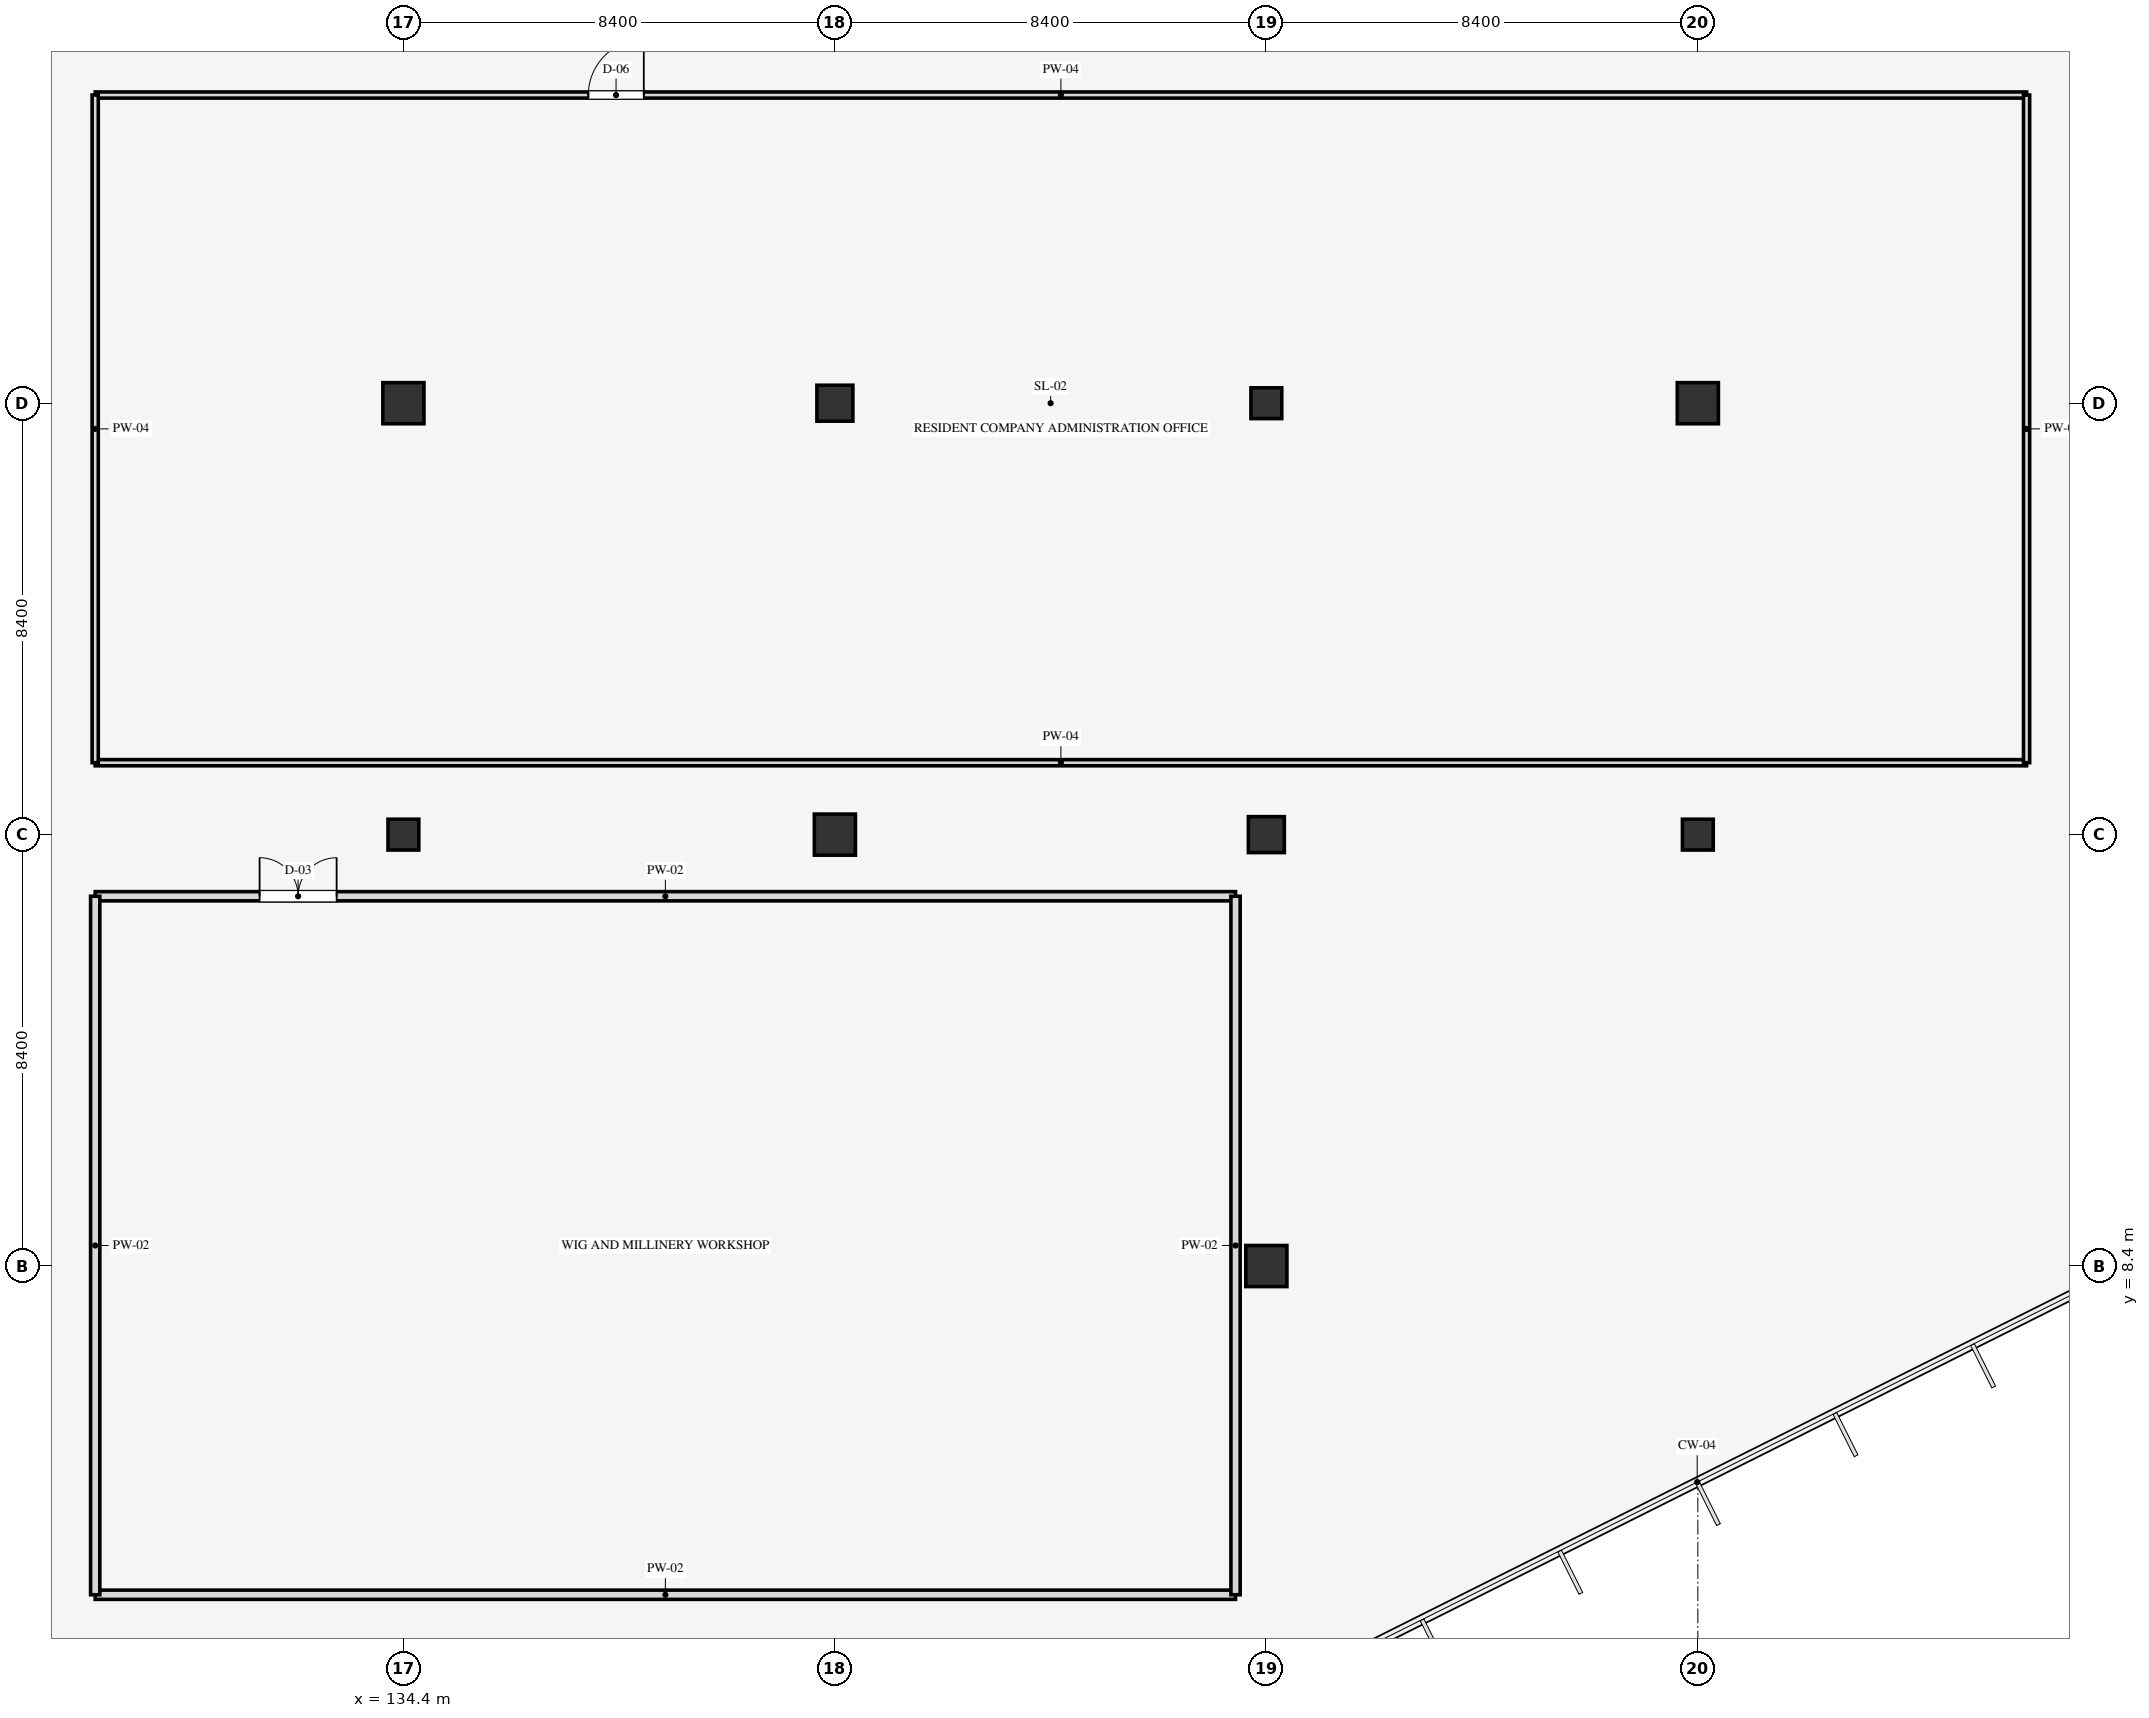
"""IFC4 building model, lengths in metres.
Left out: names, types, materials, properties, quantities, classifications, styles, units other than length and angle.
Written with IfcOpenShell. Run it as: python <this file> out.ifc"""

import sys

from ifc_helpers import new_model, si_unit, direction, frame, frame_2d, origin, origin_2d, place, context, subcontext, project, spatial, rectangle, extrude, element, fill, save


model = new_model("IFC4")
c1 = context("Model", 3, precision=1e-05, world=origin(), true_north=direction((0.0, 1.0)))
c2 = subcontext(c1, "Body", "Model", "MODEL_VIEW")
j1 = project(units=[si_unit("LENGTHUNIT", "METRE"), si_unit("PLANEANGLEUNIT", "RADIAN")], contexts=[c1])
p1 = place(None, origin())
s1 = spatial("IfcSite", under=j1, at=p1, CompositionType="ELEMENT")
p2 = place(p1, origin())
s2 = spatial("IfcBuilding", under=s1, at=p2, CompositionType="ELEMENT")
p3 = place(p2, frame((0.0, 0.0, 5.4)))
s3 = spatial("IfcBuildingStorey", under=s2, at=p3, CompositionType="ELEMENT", Elevation=5.4)
p4 = place(p3, frame((134.4, 16.8, 0.0), z_axis=(0.0, 0.0, 1.0), x_axis=(1.0, 0.0, 0.0)))
e1 = element("IfcColumn", 1, at=p4, inside=s3, PredefinedType="COLUMN", context=c2, shape_type="SweptSolid", body=[
    extrude(rectangle(XDim=0.6, YDim=0.6, at=origin_2d()), origin(), (0.0, 0.0, 1.0), 4.5),
])
for number, where, z_axis, x_axis in (
    (2, (134.4, 25.2, 0.0), (0.0, 0.0, 1.0), (1.0, 0.0, 0.0)),
    (3, (142.8, 16.8, 0.0), (0.0, 0.0, 1.0), (1.0, 0.0, 0.0)),
):
    element("IfcColumn", number, at=place(p3, frame(where, z_axis=z_axis, x_axis=x_axis)), inside=s3, PredefinedType="COLUMN", context=c2, shape_type="SweptSolid", body=[
        extrude(rectangle(XDim=0.8, YDim=0.8, at=origin_2d()), origin(), (0.0, 0.0, 1.0), 4.5),
    ])
p5 = place(p3, frame((142.8, 25.2, 0.0), z_axis=(0.0, 0.0, 1.0), x_axis=(1.0, 0.0, 0.0)))
e4 = element("IfcColumn", 4, at=p5, inside=s3, PredefinedType="COLUMN", context=c2, shape_type="SweptSolid", body=[
    extrude(rectangle(XDim=0.7, YDim=0.7, at=origin_2d()), origin(), (0.0, 0.0, 1.0), 4.5),
])
p6 = place(p3, frame((151.2, 8.4, 0.0), z_axis=(0.0, 0.0, 1.0), x_axis=(1.0, 0.0, 0.0)))
e5 = element("IfcColumn", 5, at=p6, inside=s3, PredefinedType="COLUMN", context=c2, shape_type="SweptSolid", body=[
    extrude(rectangle(XDim=0.8, YDim=0.8, at=origin_2d()), origin(), (0.0, 0.0, 1.0), 4.5),
])
p7 = place(p3, frame((151.2, 16.8, 0.0), z_axis=(0.0, 0.0, 1.0), x_axis=(1.0, 0.0, 0.0)))
e6 = element("IfcColumn", 6, at=p7, inside=s3, PredefinedType="COLUMN", context=c2, shape_type="SweptSolid", body=[
    extrude(rectangle(XDim=0.7, YDim=0.7, at=origin_2d()), origin(), (0.0, 0.0, 1.0), 4.5),
])
for number, where, z_axis, x_axis in (
    (7, (151.2, 25.2, 0.0), (0.0, 0.0, 1.0), (1.0, 0.0, 0.0)),
    (8, (159.6, 16.8, 0.0), (0.0, 0.0, 1.0), (1.0, 0.0, 0.0)),
):
    element("IfcColumn", number, at=place(p3, frame(where, z_axis=z_axis, x_axis=x_axis)), inside=s3, PredefinedType="COLUMN", context=c2, shape_type="SweptSolid", body=[
        extrude(rectangle(XDim=0.6, YDim=0.6, at=origin_2d()), origin(), (0.0, 0.0, 1.0), 4.5),
    ])
p8 = place(p3, frame((159.6, 25.2, 0.0), z_axis=(0.0, 0.0, 1.0), x_axis=(1.0, 0.0, 0.0)))
e9 = element("IfcColumn", 9, at=p8, inside=s3, PredefinedType="COLUMN", context=c2, shape_type="SweptSolid", body=[
    extrude(rectangle(XDim=0.8, YDim=0.8, at=origin_2d()), origin(), (0.0, 0.0, 1.0), 4.5),
])
p9 = place(p3, frame((128.4, 2.0, 0.0), z_axis=(0.0, 0.0, 1.0), x_axis=(1.0, 0.0, 0.0)))
e10 = element("IfcWall", 10, at=p9, inside=s3, PredefinedType="PARTITIONING", context=c2, shape_type="SweptSolid", body=[
    extrude(rectangle(XDim=22.2, YDim=0.18, at=frame_2d((11.1, 0.0))), origin(), (0.0, 0.0, 1.0), 3.54),
])
p10 = place(p3, frame((128.4, 15.6, 0.0), z_axis=(0.0, 0.0, 1.0), x_axis=(1.0, 0.0, 0.0)))
e11 = element("IfcWall", 11, at=p10, inside=s3, PredefinedType="PARTITIONING", context=c2, shape_type="SweptSolid", body=[
    extrude(rectangle(XDim=22.2, YDim=0.18, at=frame_2d((11.1, 0.0))), origin(), (0.0, 0.0, 1.0), 3.54),
])
p11 = place(p10, frame((3.2, 0.0, 0.0)))
e12 = element("IfcOpeningElement", 12, at=p11, cuts=e11, PredefinedType="OPENING", context=c2, shape_type="SweptSolid", body=[
    extrude(rectangle(XDim=1.5, YDim=2.2, at=frame_2d((0.75, 1.1))), frame((0.0, 0.1, 0.0), z_axis=(0.0, -1.0, 0.0), x_axis=(1.0, 0.0, 0.0)), (0.0, 0.0, 1.0), 0.2),
])
for number, where, z_axis, x_axis in (
    (13, (128.4, 2.0, 0.0), (0.0, 0.0, 1.0), (0.0, 1.0, 0.0)),
    (14, (150.6, 2.0, 0.0), (0.0, 0.0, 1.0), (0.0, 1.0, 0.0)),
):
    element("IfcWall", number, at=place(p3, frame(where, z_axis=z_axis, x_axis=x_axis)), inside=s3, PredefinedType="PARTITIONING", context=c2, shape_type="SweptSolid", body=[
        extrude(rectangle(XDim=13.6, YDim=0.18, at=frame_2d((6.8, 0.0))), origin(), (0.0, 0.0, 1.0), 3.54),
    ])
p12 = place(p3, frame((128.4, 18.2, 0.0), z_axis=(0.0, 0.0, 1.0), x_axis=(1.0, 0.0, 0.0)))
e15 = element("IfcWall", 15, at=p12, inside=s3, PredefinedType="PARTITIONING", context=c2, shape_type="SweptSolid", body=[
    extrude(rectangle(XDim=37.6, YDim=0.12, at=frame_2d((18.8, 0.0))), origin(), (0.0, 0.0, 1.0), 3.54),
])
p13 = place(p3, frame((128.4, 31.2, 0.0), z_axis=(0.0, 0.0, 1.0), x_axis=(1.0, 0.0, 0.0)))
e16 = element("IfcWall", 16, at=p13, inside=s3, PredefinedType="PARTITIONING", context=c2, shape_type="SweptSolid", body=[
    extrude(rectangle(XDim=37.6, YDim=0.12, at=frame_2d((18.8, 0.0))), origin(), (0.0, 0.0, 1.0), 3.54),
])
p14 = place(p13, frame((9.6, 0.0, 0.0)))
e17 = element("IfcOpeningElement", 17, at=p14, cuts=e16, PredefinedType="OPENING", context=c2, shape_type="SweptSolid", body=[
    extrude(rectangle(XDim=1.08, YDim=2.12, at=frame_2d((0.54, 1.06))), frame((0.0, 0.07, 0.0), z_axis=(0.0, -1.0, 0.0), x_axis=(1.0, 0.0, 0.0)), (0.0, 0.0, 1.0), 0.14),
])
for number, where, z_axis, x_axis in (
    (18, (128.4, 18.2, 0.0), (0.0, 0.0, 1.0), (0.0, 1.0, 0.0)),
    (19, (166.0, 18.2, 0.0), (0.0, 0.0, 1.0), (0.0, 1.0, 0.0)),
):
    element("IfcWall", number, at=place(p3, frame(where, z_axis=z_axis, x_axis=x_axis)), inside=s3, PredefinedType="PARTITIONING", context=c2, shape_type="SweptSolid", body=[
        extrude(rectangle(XDim=13.0, YDim=0.12, at=frame_2d((6.5, 0.0))), origin(), (0.0, 0.0, 1.0), 3.54),
    ])
p15 = place(p11, origin())
e20 = element("IfcDoor", 20, at=p15, inside=s3, OperationType="DOUBLE_DOOR_SINGLE_SWING", PredefinedType="DOOR", context=c2, shape_type="SweptSolid", body=[
    extrude(rectangle(XDim=1.5, YDim=2.2, at=frame_2d((0.75, 1.1))), frame((0.0, 0.025, 0.0), z_axis=(0.0, -1.0, 0.0), x_axis=(1.0, 0.0, 0.0)), (0.0, 0.0, 1.0), 0.05),
])
fill(e12, e20)
p16 = place(p14, origin())
e21 = element("IfcDoor", 21, at=p16, inside=s3, OperationType="SINGLE_SWING_RIGHT", PredefinedType="DOOR", context=c2, shape_type="SweptSolid", body=[
    extrude(rectangle(XDim=1.08, YDim=2.12, at=frame_2d((0.54, 1.06))), frame((0.0, 0.025, 0.0), z_axis=(0.0, -1.0, 0.0), x_axis=(1.0, 0.0, 0.0)), (0.0, 0.0, 1.0), 0.05),
])
fill(e17, e21)
save(model, sys.argv[1])
